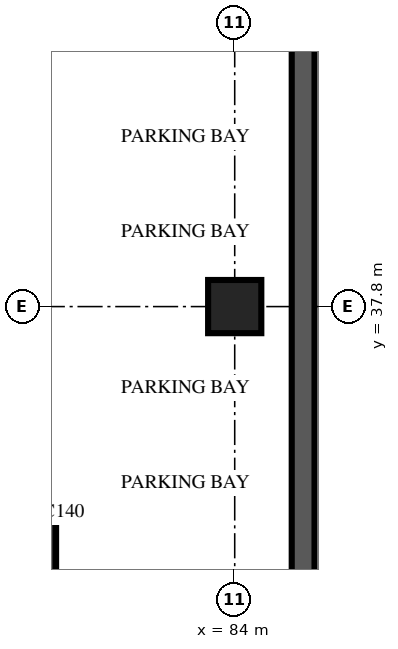
"""IFC4 building model, lengths in metres.
Left out: names, types, materials, properties, quantities, classifications, styles, units other than length and angle.
Written with IfcOpenShell. Run it as: python <this file> out.ifc"""

import sys

from ifc_helpers import new_model, si_unit, direction, frame, frame_2d, origin, origin_2d, place, context, subcontext, project, spatial, rectangle, extrude, source, transform, mapped, element, save


model = new_model("IFC4")
c1 = context("Model", 3, precision=1e-05, world=origin(), true_north=direction((0.0, 1.0)))
c2 = subcontext(c1, "Body", "Model", "MODEL_VIEW")
j1 = project(units=[si_unit("LENGTHUNIT", "METRE"), si_unit("PLANEANGLEUNIT", "RADIAN")], contexts=[c1])
p1 = place(None, origin())
s1 = spatial("IfcSite", under=j1, at=p1, CompositionType="ELEMENT")
p2 = place(p1, origin())
s2 = spatial("IfcBuilding", under=s1, at=p2, CompositionType="ELEMENT")
p3 = place(p2, frame((0.0, 0.0, -9.0)))
s3 = spatial("IfcBuildingStorey", under=s2, at=p3, CompositionType="ELEMENT", Elevation=-9.0)
m1 = source(origin(), c2, "Body", "SweptSolid", [
    extrude(rectangle(XDim=55.68, YDim=0.6, at=frame_2d((27.84, 0.0))), origin(), (0.0, 0.0, 1.0), 4.5),
])
p4 = place(p3, frame((85.8, -1.5, 0.0), z_axis=(0.0, 0.0, 1.0), x_axis=(0.0, 1.0, 0.0)))
e1 = element("IfcWall", 1, at=p4, inside=s3, PredefinedType="SOLIDWALL", context=c2, shape_type="MappedRepresentation", body=[
    mapped(m1, transform((0.0, 0.0, 0.0), scale=1.0)),
])
m2 = source(origin(), c2, "Body", "SweptSolid", [
    extrude(rectangle(XDim=1.4, YDim=1.4, at=origin_2d()), origin(), (0.0, 0.0, 1.0), 4.5),
])
for number, where, z_axis, x_axis in (
    (2, (78.6, 31.5, 0.0), (0.0, 0.0, 1.0), (1.0, 0.0, 0.0)),
    (3, (84.0, 37.8, 0.0), (0.0, 0.0, 1.0), (1.0, 0.0, 0.0)),
):
    element("IfcColumn", number, at=place(p3, frame(where, z_axis=z_axis, x_axis=x_axis)), inside=s3, PredefinedType="COLUMN", context=c2, shape_type="MappedRepresentation", body=[
        mapped(m2, transform((0.0, 0.0, 0.0), scale=1.0)),
    ])
save(model, sys.argv[1])
